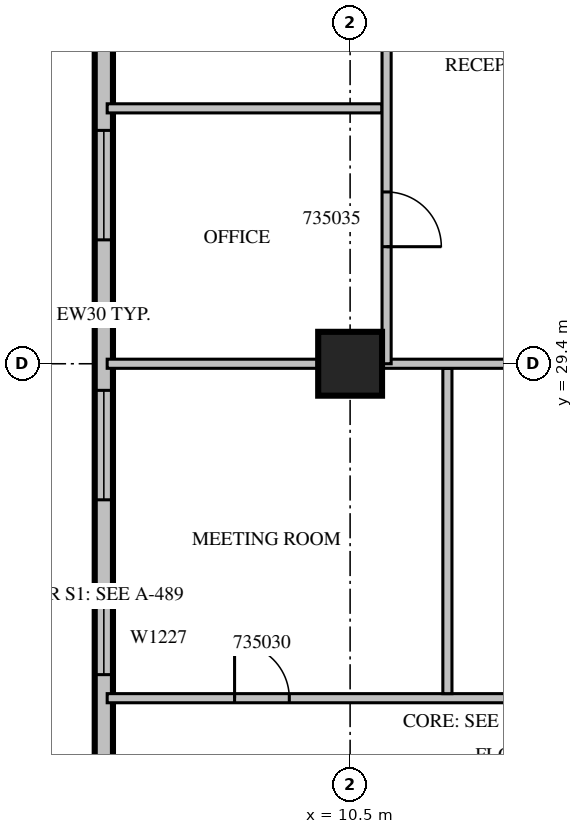
"""IFC4 building model, lengths in metres.
Left out: names, types, materials, properties, quantities, classifications, styles, units other than length and angle.
Written with IfcOpenShell. Run it as: python <this file> out.ifc"""

import sys

from ifc_helpers import new_model, si_unit, direction, frame, frame_2d, origin, origin_2d, place, context, subcontext, project, spatial, rectangle, extrude, source, transform, mapped, element, fill, save


model = new_model("IFC4")
c1 = context("Model", 3, precision=1e-05, world=origin(), true_north=direction((0.0, 1.0)))
c2 = subcontext(c1, "Body", "Model", "MODEL_VIEW")
j1 = project(units=[si_unit("LENGTHUNIT", "METRE"), si_unit("PLANEANGLEUNIT", "RADIAN")], contexts=[c1])
p1 = place(None, origin())
s1 = spatial("IfcSite", under=j1, at=p1, CompositionType="ELEMENT")
p2 = place(p1, origin())
s2 = spatial("IfcBuilding", under=s1, at=p2, CompositionType="ELEMENT")
p3 = place(p2, frame((0.0, 0.0, 158.1)))
s3 = spatial("IfcBuildingStorey", under=s2, at=p3, CompositionType="ELEMENT", Elevation=158.1)
m1 = source(origin(), c2, "Body", "SweptSolid", [
    extrude(rectangle(XDim=1.05, YDim=1.05, at=origin_2d()), origin(), (0.0, 0.0, 1.0), 4.2),
])
p4 = place(p3, frame((10.5, 29.4, 0.0), z_axis=(0.0, 0.0, 1.0), x_axis=(1.0, 0.0, 0.0)))
e1 = element("IfcColumn", 1, at=p4, inside=s3, PredefinedType="COLUMN", context=c2, shape_type="MappedRepresentation", body=[
    mapped(m1, transform((0.0, 0.0, 0.0), scale=1.0)),
])
m2 = source(origin(), c2, "Body", "SweptSolid", [
    extrude(rectangle(XDim=16.4, YDim=0.3, at=frame_2d((8.2, 0.0))), origin(), (0.0, 0.0, 1.0), 3.8),
])
p5 = place(p3, frame((6.45, 38.4, 0.0), z_axis=(0.0, 0.0, 1.0), x_axis=(0.0, -1.0, 0.0)))
e2 = element("IfcWall", 2, at=p5, inside=s3, PredefinedType="STANDARD", context=c2, shape_type="MappedRepresentation", body=[
    mapped(m2, transform((0.0, 0.0, 0.0), scale=1.0)),
])
m3 = source(origin(), c2, "Body", "SweptSolid", [
    extrude(rectangle(XDim=1.8, YDim=2.7, at=frame_2d((0.9, 1.35))), frame((0.0, 0.16, 0.0), z_axis=(0.0, -1.0, 0.0), x_axis=(1.0, 0.0, 0.0)), (0.0, 0.0, 1.0), 0.32),
])
p6 = place(p5, frame((1.15, 0.0, 0.6)))
e3 = element("IfcOpeningElement", 3, at=p6, cuts=e2, PredefinedType="OPENING", context=c2, shape_type="MappedRepresentation", body=[
    mapped(m3, transform((0.0, 0.0, 0.0), scale=1.0)),
])
p7 = place(p5, frame((5.162, 0.0, 0.6)))
e4 = element("IfcOpeningElement", 4, at=p7, cuts=e2, PredefinedType="OPENING", context=c2, shape_type="MappedRepresentation", body=[
    mapped(m3, transform((0.0, 0.0, 0.0), scale=1.0)),
])
p8 = place(p5, frame((9.438, 0.0, 0.6)))
e5 = element("IfcOpeningElement", 5, at=p8, cuts=e2, PredefinedType="OPENING", context=c2, shape_type="MappedRepresentation", body=[
    mapped(m3, transform((0.0, 0.0, 0.0), scale=1.0)),
])
m4 = source(origin(), c2, "Body", "SweptSolid", [
    extrude(rectangle(XDim=1.2, YDim=2.7, at=frame_2d((0.6, 1.35))), frame((0.0, 0.16, 0.0), z_axis=(0.0, -1.0, 0.0), x_axis=(1.0, 0.0, 0.0)), (0.0, 0.0, 1.0), 0.32),
])
p9 = place(p5, frame((12.912, 0.0, 0.6)))
e6 = element("IfcOpeningElement", 6, at=p9, cuts=e2, PredefinedType="OPENING", context=c2, shape_type="MappedRepresentation", body=[
    mapped(m4, transform((0.0, 0.0, 0.0), scale=1.0)),
])
m5 = source(origin(), c2, "Body", "SweptSolid", [
    extrude(rectangle(XDim=8.195, YDim=0.15, at=frame_2d((4.098, 0.0))), origin(), (0.0, 0.0, 1.0), 3.8),
])
p10 = place(p3, frame((6.505, 23.9, 0.0), z_axis=(0.0, 0.0, 1.0), x_axis=(1.0, 0.0, 0.0)))
e7 = element("IfcWall", 7, at=p10, inside=s3, PredefinedType="PARTITIONING", context=c2, shape_type="MappedRepresentation", body=[
    mapped(m5, transform((0.0, 0.0, 0.0), scale=1.0)),
])
m6 = source(origin(), c2, "Body", "SweptSolid", [
    extrude(rectangle(XDim=0.9, YDim=2.1, at=frame_2d((0.45, 1.05))), frame((0.0, 0.085, 0.0), z_axis=(0.0, -1.0, 0.0), x_axis=(1.0, 0.0, 0.0)), (0.0, 0.0, 1.0), 0.17),
])
p11 = place(p10, frame((2.095, 0.0, 0.0)))
e8 = element("IfcOpeningElement", 8, at=p11, cuts=e7, PredefinedType="OPENING", context=c2, shape_type="MappedRepresentation", body=[
    mapped(m6, transform((0.0, 0.0, 0.0), scale=1.0)),
])
p12 = place(p10, frame((7.02, 0.0, 0.0)))
e9 = element("IfcOpeningElement", 9, at=p12, cuts=e7, PredefinedType="OPENING", context=c2, shape_type="MappedRepresentation", body=[
    mapped(m6, transform((0.0, 0.0, 0.0), scale=1.0)),
])
m7 = source(origin(), c2, "Body", "SweptSolid", [
    extrude(rectangle(XDim=5.35, YDim=0.15, at=frame_2d((2.675, 0.0))), origin(), (0.0, 0.0, 1.0), 3.8),
])
p13 = place(p3, frame((12.1, 23.975, 0.0), z_axis=(0.0, 0.0, 1.0), x_axis=(0.0, 1.0, 0.0)))
e10 = element("IfcWall", 10, at=p13, inside=s3, PredefinedType="PARTITIONING", context=c2, shape_type="MappedRepresentation", body=[
    mapped(m7, transform((0.0, 0.0, 0.0), scale=1.0)),
])
m8 = source(origin(), c2, "Body", "SweptSolid", [
    extrude(rectangle(XDim=3.471, YDim=0.15, at=frame_2d((1.736, 0.0))), origin(), (0.0, 0.0, 1.0), 3.8),
])
p14 = place(p3, frame((9.976, 29.4, 0.0), z_axis=(0.0, 0.0, 1.0), x_axis=(-1.0, 0.0, 0.0)))
e11 = element("IfcWall", 11, at=p14, inside=s3, PredefinedType="PARTITIONING", context=c2, shape_type="MappedRepresentation", body=[
    mapped(m8, transform((0.0, 0.0, 0.0), scale=1.0)),
])
m9 = source(origin(), c2, "Body", "SweptSolid", [
    extrude(rectangle(XDim=3.676, YDim=0.15, at=frame_2d((1.838, 0.0))), origin(), (0.0, 0.0, 1.0), 3.8),
])
p15 = place(p3, frame((14.7, 29.4, 0.0), z_axis=(0.0, 0.0, 1.0), x_axis=(-1.0, 0.0, 0.0)))
e12 = element("IfcWall", 12, at=p15, inside=s3, PredefinedType="PARTITIONING", context=c2, shape_type="MappedRepresentation", body=[
    mapped(m9, transform((0.0, 0.0, 0.0), scale=1.0)),
])
m10 = source(origin(), c2, "Body", "SweptSolid", [
    extrude(rectangle(XDim=4.52, YDim=0.15, at=frame_2d((2.26, 0.0))), origin(), (0.0, 0.0, 1.0), 3.8),
])
p16 = place(p3, frame((11.025, 33.6, 0.0), z_axis=(0.0, 0.0, 1.0), x_axis=(-1.0, 0.0, 0.0)))
e13 = element("IfcWall", 13, at=p16, inside=s3, PredefinedType="PARTITIONING", context=c2, shape_type="MappedRepresentation", body=[
    mapped(m10, transform((0.0, 0.0, 0.0), scale=1.0)),
])
m11 = source(origin(), c2, "Body", "SweptSolid", [
    extrude(rectangle(XDim=8.4, YDim=0.15, at=frame_2d((4.2, 0.0))), origin(), (0.0, 0.0, 1.0), 3.8),
])
p17 = place(p3, frame((11.1, 29.4, 0.0), z_axis=(0.0, 0.0, 1.0), x_axis=(0.0, 1.0, 0.0)))
e14 = element("IfcWall", 14, at=p17, inside=s3, PredefinedType="PARTITIONING", context=c2, shape_type="MappedRepresentation", body=[
    mapped(m11, transform((0.0, 0.0, 0.0), scale=1.0)),
])
p18 = place(p17, frame((1.925, 0.0, 0.0)))
e15 = element("IfcOpeningElement", 15, at=p18, cuts=e14, PredefinedType="OPENING", context=c2, shape_type="MappedRepresentation", body=[
    mapped(m6, transform((0.0, 0.0, 0.0), scale=1.0)),
])
p19 = place(p17, frame((5.625, 0.0, 0.0)))
e16 = element("IfcOpeningElement", 16, at=p19, cuts=e14, PredefinedType="OPENING", context=c2, shape_type="MappedRepresentation", body=[
    mapped(m6, transform((0.0, 0.0, 0.0), scale=1.0)),
])
m12 = source(origin(), c2, "Body", "SweptSolid", [
    extrude(rectangle(XDim=1.8, YDim=2.7, at=frame_2d((0.9, 1.35))), frame((0.0, 0.03, 0.0), z_axis=(0.0, -1.0, 0.0), x_axis=(1.0, 0.0, 0.0)), (0.0, 0.0, 1.0), 0.06),
])
p20 = place(p7, origin())
e17 = element("IfcWindow", 17, at=p20, inside=s3, PartitioningType="SINGLE_PANEL", PredefinedType="WINDOW", context=c2, shape_type="MappedRepresentation", body=[
    mapped(m12, transform((0.0, 0.0, 0.0), scale=1.0)),
])
fill(e4, e17)
p21 = place(p8, origin())
e18 = element("IfcWindow", 18, at=p21, inside=s3, PartitioningType="SINGLE_PANEL", PredefinedType="WINDOW", context=c2, shape_type="MappedRepresentation", body=[
    mapped(m12, transform((0.0, 0.0, 0.0), scale=1.0)),
])
fill(e5, e18)
m13 = source(origin(), c2, "Body", "SweptSolid", [
    extrude(rectangle(XDim=1.2, YDim=2.7, at=frame_2d((0.6, 1.35))), frame((0.0, 0.03, 0.0), z_axis=(0.0, -1.0, 0.0), x_axis=(1.0, 0.0, 0.0)), (0.0, 0.0, 1.0), 0.06),
])
p22 = place(p9, origin())
e19 = element("IfcWindow", 19, at=p22, inside=s3, PartitioningType="SINGLE_PANEL", PredefinedType="WINDOW", context=c2, shape_type="MappedRepresentation", body=[
    mapped(m13, transform((0.0, 0.0, 0.0), scale=1.0)),
])
fill(e6, e19)
m14 = source(origin(), c2, "Body", "SweptSolid", [
    extrude(rectangle(XDim=0.9, YDim=2.1, at=frame_2d((0.45, 1.05))), frame((0.0, 0.025, 0.0), z_axis=(0.0, -1.0, 0.0), x_axis=(1.0, 0.0, 0.0)), (0.0, 0.0, 1.0), 0.05),
])
p23 = place(p11, origin())
e20 = element("IfcDoor", 20, at=p23, inside=s3, OperationType="SINGLE_SWING_LEFT", PredefinedType="DOOR", context=c2, shape_type="MappedRepresentation", body=[
    mapped(m14, transform((0.0, 0.0, 0.0), scale=1.0)),
])
fill(e8, e20)
p24 = place(p18, origin())
e21 = element("IfcDoor", 21, at=p24, inside=s3, OperationType="SINGLE_SWING_RIGHT", PredefinedType="DOOR", context=c2, shape_type="MappedRepresentation", body=[
    mapped(m14, transform((0.0, 0.0, 0.0), scale=1.0)),
])
fill(e15, e21)
save(model, sys.argv[1])
